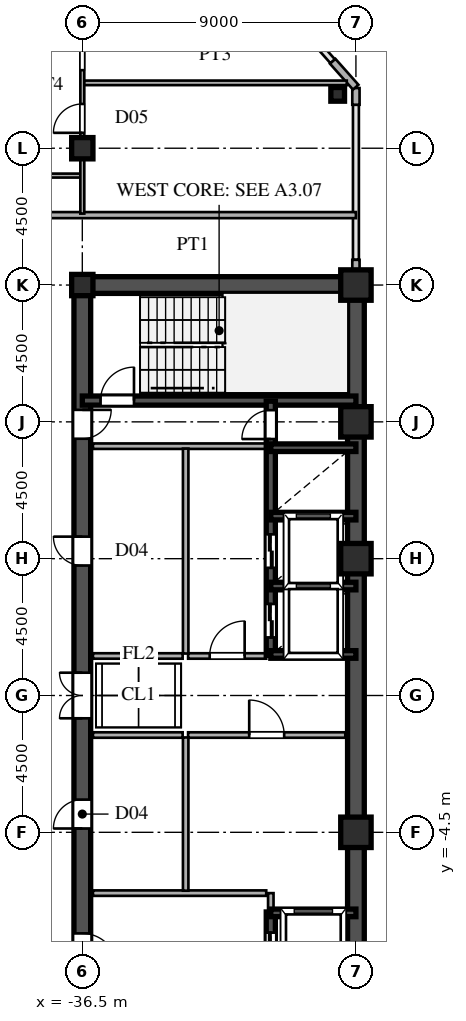
"""IFC4 building model, lengths in metres.
Left out: names, types, materials, properties, quantities, classifications, styles, units other than length and angle.
Written with IfcOpenShell. Run it as: python <this file> out.ifc"""

import sys

from ifc_helpers import new_model, si_unit, direction, frame, frame_2d, origin, origin_2d, place, context, subcontext, project, spatial, rectangle, hollow_rectangle, i_section, extrude, source, transform, mapped, element, fill, save


model = new_model("IFC4")
c1 = context("Model", 3, precision=1e-05, world=origin(), true_north=direction((0.0, 1.0)))
c2 = subcontext(c1, "Body", "Model", "MODEL_VIEW")
j1 = project(units=[si_unit("LENGTHUNIT", "METRE"), si_unit("PLANEANGLEUNIT", "RADIAN")], contexts=[c1])
p1 = place(None, origin())
s1 = spatial("IfcSite", under=j1, at=p1, CompositionType="ELEMENT")
p2 = place(p1, origin())
s2 = spatial("IfcBuilding", under=s1, at=p2, CompositionType="ELEMENT")
p3 = place(p2, frame((0.0, 0.0, 144.0)))
s3 = spatial("IfcBuildingStorey", under=s2, at=p3, CompositionType="ELEMENT", Elevation=144.0)
m1 = source(origin(), c2, "Body", "SweptSolid", [
    extrude(hollow_rectangle(XDim=1.0, YDim=1.0, WallThickness=0.042, at=origin_2d()), origin(), (0.0, 0.0, 1.0), 3.6),
])
for number, where, z_axis, x_axis in (
    (1, (-27.5, -4.5, 0.0), (0.0, 0.0, 1.0), (1.0, 0.0, 0.0)),
    (2, (-27.5, 4.5, 0.0), (0.0, 0.0, 1.0), (1.0, 0.0, 0.0)),
    (3, (-27.5, 9.0, 0.0), (0.0, 0.0, 1.0), (1.0, 0.0, 0.0)),
    (4, (-27.5, 13.5, 0.0), (0.0, 0.0, 1.0), (1.0, 0.0, 0.0)),
):
    element("IfcColumn", number, at=place(p3, frame(where, z_axis=z_axis, x_axis=x_axis)), inside=s3, PredefinedType="COLUMN", context=c2, shape_type="MappedRepresentation", body=[
        mapped(m1, transform((0.0, 0.0, 0.0), scale=1.0)),
    ])
m2 = source(origin(), c2, "Body", "SweptSolid", [
    extrude(i_section(OverallWidth=0.7, OverallDepth=0.7, WebThickness=0.028, FlangeThickness=0.045, at=origin_2d()), origin(), (0.0, 0.0, 1.0), 3.6),
])
for number, where, z_axis, x_axis in (
    (5, (-36.5, 13.5, 0.0), (0.0, 0.0, 1.0), (1.0, 0.0, 0.0)),
    (6, (-36.5, 18.0, 0.0), (0.0, 0.0, 1.0), (1.0, 0.0, 0.0)),
):
    element("IfcColumn", number, at=place(p3, frame(where, z_axis=z_axis, x_axis=x_axis)), inside=s3, PredefinedType="COLUMN", context=c2, shape_type="MappedRepresentation", body=[
        mapped(m2, transform((0.0, 0.0, 0.0), scale=1.0)),
    ])
m3 = source(origin(), c2, "Body", "SweptSolid", [
    extrude(hollow_rectangle(XDim=0.45, YDim=0.45, WallThickness=0.018, at=origin_2d()), origin(), (0.0, 0.0, 1.0), 3.6),
])
p4 = place(p3, frame((-28.1, 19.772, 0.0), z_axis=(0.0, 0.0, 1.0), x_axis=(1.0, 0.0, 0.0)))
e7 = element("IfcColumn", 7, at=p4, inside=s3, PredefinedType="COLUMN", context=c2, shape_type="MappedRepresentation", body=[
    mapped(m3, transform((0.0, 0.0, 0.0), scale=1.0)),
])
p5 = place(p3, frame((-27.5, 13.78, 0.0), z_axis=(0.0, 0.0, 1.0), x_axis=(0.0, 1.0, 0.0)))
e8 = element("IfcWall", 8, at=p5, inside=s3, PredefinedType="SOLIDWALL", context=c2, shape_type="SweptSolid", body=[
    extrude(rectangle(XDim=0.55, YDim=0.24, at=frame_2d((0.275, 0.0))), origin(), (0.0, 0.0, 1.0), 2.88),
])
p6 = place(p3, frame((-27.5, 19.43, 0.0), z_axis=(0.0, 0.0, 1.0), x_axis=(0.0, 1.0, 0.0)))
e9 = element("IfcWall", 9, at=p6, inside=s3, PredefinedType="SOLIDWALL", context=c2, shape_type="SweptSolid", body=[
    extrude(rectangle(XDim=0.55, YDim=0.24, at=frame_2d((0.275, 0.0))), origin(), (0.0, 0.0, 1.0), 3.38),
])
p7 = place(p3, frame((-27.507, 20.008, 0.0), z_axis=(0.0, 0.0, 1.0), x_axis=(-0.664337252513, 0.747432950119, 0.0)))
e10 = element("IfcWall", 10, at=p7, inside=s3, PredefinedType="SOLIDWALL", context=c2, shape_type="SweptSolid", body=[
    extrude(rectangle(XDim=1.14, YDim=0.24, at=frame_2d((0.57, 0.0))), origin(), (0.0, 0.0, 1.0), 3.38),
])
for number, where, z_axis, x_axis in (
    (11, (-27.5, -13.5, 0.0), (0.0, 0.0, 1.0), (0.0, 1.0, 0.0)),
    (12, (-27.5, 1.3, 0.0), (0.0, 0.0, 1.0), (0.0, 1.0, 0.0)),
):
    element("IfcWall", number, at=place(p3, frame(where, z_axis=z_axis, x_axis=x_axis)), inside=s3, PredefinedType="SHEAR", context=c2, shape_type="SweptSolid", body=[
        extrude(rectangle(XDim=12.2, YDim=0.55, at=frame_2d((6.1, 0.0))), origin(), (0.0, 0.0, 1.0), 3.38),
    ])
p8 = place(p3, frame((-27.5, -1.3, 0.0), z_axis=(0.0, 0.0, 1.0), x_axis=(0.0, 1.0, 0.0)))
e13 = element("IfcWall", 13, at=p8, inside=s3, PredefinedType="SHEAR", context=c2, shape_type="SweptSolid", body=[
    extrude(rectangle(XDim=2.6, YDim=0.55, at=frame_2d((1.3, 0.0))), origin(), (0.0, 0.0, 1.0), 3.38),
])
p9 = place(p3, frame((-36.5, 13.5, 0.0), z_axis=(0.0, 0.0, 1.0), x_axis=(1.0, 0.0, 0.0)))
e14 = element("IfcWall", 14, at=p9, inside=s3, PredefinedType="SHEAR", context=c2, shape_type="SweptSolid", body=[
    extrude(rectangle(XDim=9.0, YDim=0.55, at=frame_2d((4.5, 0.0))), origin(), (0.0, 0.0, 1.0), 3.38),
])
p10 = place(p3, frame((-36.5, -13.65, 0.0), z_axis=(0.0, 0.0, 1.0), x_axis=(0.0, 1.0, 0.0)))
e15 = element("IfcWall", 15, at=p10, inside=s3, PredefinedType="SHEAR", context=c2, shape_type="SweptSolid", body=[
    extrude(rectangle(XDim=7.15, YDim=0.55, at=frame_2d((3.575, 0.0))), origin(), (0.0, 0.0, 1.0), 3.38),
])
p11 = place(p10, frame((4.675, 0.0, 0.0)))
e16 = element("IfcOpeningElement", 16, at=p11, cuts=e15, PredefinedType="OPENING", context=c2, shape_type="SweptSolid", body=[
    extrude(rectangle(XDim=1.15, YDim=2.2, at=frame_2d((0.575, 1.1))), frame((0.0, 0.285, 0.0), z_axis=(0.0, -1.0, 0.0), x_axis=(1.0, 0.0, 0.0)), (0.0, 0.0, 1.0), 0.57),
])
p12 = place(p3, frame((-36.5, -1.3, 0.0), z_axis=(0.0, 0.0, 1.0), x_axis=(0.0, 1.0, 0.0)))
e17 = element("IfcWall", 17, at=p12, inside=s3, PredefinedType="SHEAR", context=c2, shape_type="SweptSolid", body=[
    extrude(rectangle(XDim=2.6, YDim=0.55, at=frame_2d((1.3, 0.0))), origin(), (0.0, 0.0, 1.0), 3.38),
])
p13 = place(p12, frame((0.55, 0.0, 0.0)))
e18 = element("IfcOpeningElement", 18, at=p13, cuts=e17, PredefinedType="OPENING", context=c2, shape_type="SweptSolid", body=[
    extrude(rectangle(XDim=1.5, YDim=2.3, at=frame_2d((0.75, 1.15))), frame((0.0, 0.285, 0.0), z_axis=(0.0, -1.0, 0.0), x_axis=(1.0, 0.0, 0.0)), (0.0, 0.0, 1.0), 0.57),
])
p14 = place(p3, frame((-36.5, 8.2, 0.0), z_axis=(0.0, 0.0, 1.0), x_axis=(0.0, 1.0, 0.0)))
e19 = element("IfcWall", 19, at=p14, inside=s3, PredefinedType="SHEAR", context=c2, shape_type="SweptSolid", body=[
    extrude(rectangle(XDim=5.45, YDim=0.55, at=frame_2d((2.725, 0.0))), origin(), (0.0, 0.0, 1.0), 3.38),
])
p15 = place(p14, frame((0.245, 0.0, 0.0)))
e20 = element("IfcOpeningElement", 20, at=p15, cuts=e19, PredefinedType="OPENING", context=c2, shape_type="SweptSolid", body=[
    extrude(rectangle(XDim=0.95, YDim=2.15, at=frame_2d((0.475, 1.075))), frame((0.0, 0.285, 0.0), z_axis=(0.0, -1.0, 0.0), x_axis=(1.0, 0.0, 0.0)), (0.0, 0.0, 1.0), 0.57),
])
p16 = place(p3, frame((-36.5, -6.5, 0.0), z_axis=(0.0, 0.0, 1.0), x_axis=(0.0, 1.0, 0.0)))
e21 = element("IfcWall", 21, at=p16, inside=s3, PredefinedType="SHEAR", context=c2, shape_type="SweptSolid", body=[
    extrude(rectangle(XDim=5.2, YDim=0.55, at=frame_2d((2.6, 0.0))), origin(), (0.0, 0.0, 1.0), 3.38),
])
p17 = place(p16, frame((2.125, 0.0, 0.0)))
e22 = element("IfcOpeningElement", 22, at=p17, cuts=e21, PredefinedType="OPENING", context=c2, shape_type="SweptSolid", body=[
    extrude(rectangle(XDim=0.95, YDim=2.15, at=frame_2d((0.475, 1.075))), frame((0.0, 0.285, 0.0), z_axis=(0.0, -1.0, 0.0), x_axis=(1.0, 0.0, 0.0)), (0.0, 0.0, 1.0), 0.57),
])
p18 = place(p3, frame((-36.5, 1.3, 0.0), z_axis=(0.0, 0.0, 1.0), x_axis=(0.0, 1.0, 0.0)))
e23 = element("IfcWall", 23, at=p18, inside=s3, PredefinedType="SHEAR", context=c2, shape_type="SweptSolid", body=[
    extrude(rectangle(XDim=6.9, YDim=0.55, at=frame_2d((3.45, 0.0))), origin(), (0.0, 0.0, 1.0), 3.38),
])
p19 = place(p18, frame((2.975, 0.0, 0.0)))
e24 = element("IfcOpeningElement", 24, at=p19, cuts=e23, PredefinedType="OPENING", context=c2, shape_type="SweptSolid", body=[
    extrude(rectangle(XDim=0.95, YDim=2.15, at=frame_2d((0.475, 1.075))), frame((0.0, 0.285, 0.0), z_axis=(0.0, -1.0, 0.0), x_axis=(1.0, 0.0, 0.0)), (0.0, 0.0, 1.0), 0.57),
])
p20 = place(p3, frame((-36.5, 9.7, 0.0), z_axis=(0.0, 0.0, 1.0), x_axis=(1.0, 0.0, 0.0)))
e25 = element("IfcWall", 25, at=p20, inside=s3, PredefinedType="SHEAR", context=c2, shape_type="SweptSolid", body=[
    extrude(rectangle(XDim=9.0, YDim=0.3, at=frame_2d((4.5, 0.0))), origin(), (0.0, 0.0, 1.0), 3.38),
])
p21 = place(p20, frame((0.6, 0.0, 0.0)))
e26 = element("IfcOpeningElement", 26, at=p21, cuts=e25, PredefinedType="OPENING", context=c2, shape_type="SweptSolid", body=[
    extrude(rectangle(XDim=1.1, YDim=2.2, at=frame_2d((0.55, 1.1))), frame((0.0, 0.16, 0.0), z_axis=(0.0, -1.0, 0.0), x_axis=(1.0, 0.0, 0.0)), (0.0, 0.0, 1.0), 0.32),
])
for number, where, z_axis, x_axis in (
    (27, (-30.3, -7.15, 0.0), (0.0, 0.0, 1.0), (1.0, 0.0, 0.0)),
    (28, (-30.3, 1.35, 0.0), (0.0, 0.0, 1.0), (1.0, 0.0, 0.0)),
    (29, (-30.3, 3.6, 0.0), (0.0, 0.0, 1.0), (1.0, 0.0, 0.0)),
    (30, (-30.3, 5.9, 0.0), (0.0, 0.0, 1.0), (1.0, 0.0, 0.0)),
    (31, (-30.3, 8.15, 0.0), (0.0, 0.0, 1.0), (1.0, 0.0, 0.0)),
):
    element("IfcWall", number, at=place(p3, frame(where, z_axis=z_axis, x_axis=x_axis)), inside=s3, PredefinedType="SHEAR", context=c2, shape_type="SweptSolid", body=[
        extrude(rectangle(XDim=2.8, YDim=0.25, at=frame_2d((1.4, 0.0))), origin(), (0.0, 0.0, 1.0), 3.38),
    ])
p22 = place(p3, frame((-30.3, -9.68, 0.0), z_axis=(0.0, 0.0, 1.0), x_axis=(0.0, 1.0, 0.0)))
e32 = element("IfcWall", 32, at=p22, inside=s3, PredefinedType="SHEAR", context=c2, shape_type="SweptSolid", body=[
    extrude(rectangle(XDim=2.56, YDim=0.3, at=frame_2d((1.28, 0.0))), origin(), (0.0, 0.0, 1.0), 3.38),
])
p23 = place(p22, frame((0.68, 0.0, 0.0)))
e33 = element("IfcOpeningElement", 33, at=p23, cuts=e32, PredefinedType="OPENING", context=c2, shape_type="SweptSolid", body=[
    extrude(rectangle(XDim=1.2, YDim=2.25, at=frame_2d((0.6, 1.125))), frame((0.0, 0.16, 0.0), z_axis=(0.0, -1.0, 0.0), x_axis=(1.0, 0.0, 0.0)), (0.0, 0.0, 1.0), 0.32),
])
p24 = place(p3, frame((-30.3, 1.32, 0.0), z_axis=(0.0, 0.0, 1.0), x_axis=(0.0, 1.0, 0.0)))
e34 = element("IfcWall", 34, at=p24, inside=s3, PredefinedType="SHEAR", context=c2, shape_type="SweptSolid", body=[
    extrude(rectangle(XDim=2.28, YDim=0.3, at=frame_2d((1.14, 0.0))), origin(), (0.0, 0.0, 1.0), 3.38),
])
p25 = place(p24, frame((0.59, 0.0, 0.0)))
e35 = element("IfcOpeningElement", 35, at=p25, cuts=e34, PredefinedType="OPENING", context=c2, shape_type="SweptSolid", body=[
    extrude(rectangle(XDim=1.1, YDim=2.2, at=frame_2d((0.55, 1.1))), frame((0.0, 0.16, 0.0), z_axis=(0.0, -1.0, 0.0), x_axis=(1.0, 0.0, 0.0)), (0.0, 0.0, 1.0), 0.32),
])
p26 = place(p3, frame((-30.3, 3.6, 0.0), z_axis=(0.0, 0.0, 1.0), x_axis=(0.0, 1.0, 0.0)))
e36 = element("IfcWall", 36, at=p26, inside=s3, PredefinedType="SHEAR", context=c2, shape_type="SweptSolid", body=[
    extrude(rectangle(XDim=2.3, YDim=0.3, at=frame_2d((1.15, 0.0))), origin(), (0.0, 0.0, 1.0), 3.38),
])
p27 = place(p26, frame((0.6, 0.0, 0.0)))
e37 = element("IfcOpeningElement", 37, at=p27, cuts=e36, PredefinedType="OPENING", context=c2, shape_type="SweptSolid", body=[
    extrude(rectangle(XDim=1.1, YDim=2.2, at=frame_2d((0.55, 1.1))), frame((0.0, 0.16, 0.0), z_axis=(0.0, -1.0, 0.0), x_axis=(1.0, 0.0, 0.0)), (0.0, 0.0, 1.0), 0.32),
])
p28 = place(p3, frame((-30.3, 5.9, 0.0), z_axis=(0.0, 0.0, 1.0), x_axis=(0.0, 1.0, 0.0)))
e38 = element("IfcWall", 38, at=p28, inside=s3, PredefinedType="SHEAR", context=c2, shape_type="SweptSolid", body=[
    extrude(rectangle(XDim=2.25, YDim=0.3, at=frame_2d((1.125, 0.0))), origin(), (0.0, 0.0, 1.0), 3.38),
])
p29 = place(p3, frame((-30.3, 8.15, 0.0), z_axis=(0.0, 0.0, 1.0), x_axis=(0.0, 1.0, 0.0)))
e39 = element("IfcWall", 39, at=p29, inside=s3, PredefinedType="SHEAR", context=c2, shape_type="SweptSolid", body=[
    extrude(rectangle(XDim=1.53, YDim=0.3, at=frame_2d((0.765, 0.0))), origin(), (0.0, 0.0, 1.0), 3.38),
])
p30 = place(p29, frame((0.285, 0.0, 0.0)))
e40 = element("IfcOpeningElement", 40, at=p30, cuts=e39, PredefinedType="OPENING", context=c2, shape_type="SweptSolid", body=[
    extrude(rectangle(XDim=0.95, YDim=2.15, at=frame_2d((0.475, 1.075))), frame((0.0, 0.16, 0.0), z_axis=(0.0, -1.0, 0.0), x_axis=(1.0, 0.0, 0.0)), (0.0, 0.0, 1.0), 0.32),
])
p31 = place(p3, frame((-36.15, -6.5, 0.0), z_axis=(0.0, 0.0, 1.0), x_axis=(1.0, 0.0, 0.0)))
e41 = element("IfcWall", 41, at=p31, inside=s3, PredefinedType="PARTITIONING", context=c2, shape_type="SweptSolid", body=[
    extrude(rectangle(XDim=5.7, YDim=0.18, at=frame_2d((2.85, 0.0))), origin(), (0.0, 0.0, 1.0), 3.38),
])
p32 = place(p3, frame((-30.3, -7.12, 0.0), z_axis=(0.0, 0.0, 1.0), x_axis=(0.0, 1.0, 0.0)))
e42 = element("IfcWall", 42, at=p32, inside=s3, PredefinedType="PARTITIONING", context=c2, shape_type="SweptSolid", body=[
    extrude(rectangle(XDim=0.62, YDim=0.18, at=frame_2d((0.31, 0.0))), origin(), (0.0, 0.0, 1.0), 3.38),
])
p33 = place(p3, frame((-36.15, 8.2, 0.0), z_axis=(0.0, 0.0, 1.0), x_axis=(1.0, 0.0, 0.0)))
e43 = element("IfcWall", 43, at=p33, inside=s3, PredefinedType="PARTITIONING", context=c2, shape_type="SweptSolid", body=[
    extrude(rectangle(XDim=5.7, YDim=0.18, at=frame_2d((2.85, 0.0))), origin(), (0.0, 0.0, 1.0), 3.38),
])
p34 = place(p3, frame((-33.1, -6.42, 0.0), z_axis=(0.0, 0.0, 1.0), x_axis=(0.0, 1.0, 0.0)))
e44 = element("IfcWall", 44, at=p34, inside=s3, PredefinedType="PARTITIONING", context=c2, shape_type="SweptSolid", body=[
    extrude(rectangle(XDim=5.04, YDim=0.18, at=frame_2d((2.52, 0.0))), origin(), (0.0, 0.0, 1.0), 3.38),
])
p35 = place(p3, frame((-33.1, 1.38, 0.0), z_axis=(0.0, 0.0, 1.0), x_axis=(0.0, 1.0, 0.0)))
e45 = element("IfcWall", 45, at=p35, inside=s3, PredefinedType="PARTITIONING", context=c2, shape_type="SweptSolid", body=[
    extrude(rectangle(XDim=6.74, YDim=0.18, at=frame_2d((3.37, 0.0))), origin(), (0.0, 0.0, 1.0), 3.38),
])
p36 = place(p3, frame((-33.02, -1.3, 0.0), z_axis=(0.0, 0.0, 1.0), x_axis=(1.0, 0.0, 0.0)))
e46 = element("IfcWall", 46, at=p36, inside=s3, PredefinedType="PARTITIONING", context=c2, shape_type="SweptSolid", body=[
    extrude(rectangle(XDim=5.17, YDim=0.18, at=frame_2d((2.585, 0.0))), origin(), (0.0, 0.0, 1.0), 3.38),
])
p37 = place(p36, frame((2.01, 0.0, 0.0)))
e47 = element("IfcOpeningElement", 47, at=p37, cuts=e46, PredefinedType="OPENING", context=c2, shape_type="SweptSolid", body=[
    extrude(rectangle(XDim=1.15, YDim=2.2, at=frame_2d((0.575, 1.1))), frame((0.0, 0.1, 0.0), z_axis=(0.0, -1.0, 0.0), x_axis=(1.0, 0.0, 0.0)), (0.0, 0.0, 1.0), 0.2),
])
p38 = place(p3, frame((-33.02, 1.3, 0.0), z_axis=(0.0, 0.0, 1.0), x_axis=(1.0, 0.0, 0.0)))
e48 = element("IfcWall", 48, at=p38, inside=s3, PredefinedType="PARTITIONING", context=c2, shape_type="SweptSolid", body=[
    extrude(rectangle(XDim=2.57, YDim=0.18, at=frame_2d((1.285, 0.0))), origin(), (0.0, 0.0, 1.0), 3.38),
])
p39 = place(p38, frame((0.71, 0.0, 0.0)))
e49 = element("IfcOpeningElement", 49, at=p39, cuts=e48, PredefinedType="OPENING", context=c2, shape_type="SweptSolid", body=[
    extrude(rectangle(XDim=1.15, YDim=2.2, at=frame_2d((0.575, 1.1))), frame((0.0, 0.1, 0.0), z_axis=(0.0, -1.0, 0.0), x_axis=(1.0, 0.0, 0.0)), (0.0, 0.0, 1.0), 0.2),
])
for number, where, z_axis, x_axis in (
    (50, (-36.15, -1.3, 0.0), (0.0, 0.0, 1.0), (1.0, 0.0, 0.0)),
    (51, (-36.15, 1.3, 0.0), (0.0, 0.0, 1.0), (1.0, 0.0, 0.0)),
):
    element("IfcWall", number, at=place(p3, frame(where, z_axis=z_axis, x_axis=x_axis)), inside=s3, PredefinedType="PARTITIONING", context=c2, shape_type="SweptSolid", body=[
        extrude(rectangle(XDim=2.95, YDim=0.18, at=frame_2d((1.475, 0.0))), origin(), (0.0, 0.0, 1.0), 3.38),
    ])
p40 = place(p3, frame((-38.215, 15.8, 0.0), z_axis=(0.0, 0.0, 1.0), x_axis=(1.0, 0.0, 0.0)))
e52 = element("IfcWall", 52, at=p40, inside=s3, PredefinedType="PARTITIONING", context=c2, shape_type="SweptSolid", body=[
    extrude(rectangle(XDim=10.715, YDim=0.2, at=frame_2d((5.357, 0.0))), origin(), (0.0, 0.0, 1.0), 3.38),
])
p41 = place(p3, frame((-41.0, 17.1, 0.0), z_axis=(0.0, 0.0, 1.0), x_axis=(1.0, 0.0, 0.0)))
e53 = element("IfcWall", 53, at=p41, inside=s3, PredefinedType="PARTITIONING", context=c2, shape_type="SweptSolid", body=[
    extrude(rectangle(XDim=4.45, YDim=0.13, at=frame_2d((2.225, 0.0))), origin(), (0.0, 0.0, 1.0), 3.38),
])
p42 = place(p3, frame((-36.45, 20.15, 0.0), z_axis=(0.0, 0.0, 1.0), x_axis=(1.0, 0.0, 0.0)))
e54 = element("IfcWall", 54, at=p42, inside=s3, PredefinedType="PARTITIONING", context=c2, shape_type="SweptSolid", body=[
    extrude(rectangle(XDim=8.649, YDim=0.15, at=frame_2d((4.325, 0.0))), origin(), (0.0, 0.0, 1.0), 3.38),
])
p43 = place(p3, frame((-36.5, 15.85, 0.0), z_axis=(0.0, 0.0, 1.0), x_axis=(0.0, 1.0, 0.0)))
e55 = element("IfcWall", 55, at=p43, inside=s3, PredefinedType="PARTITIONING", context=c2, shape_type="SweptSolid", body=[
    extrude(rectangle(XDim=6.119, YDim=0.13, at=frame_2d((3.06, 0.0))), origin(), (0.0, 0.0, 1.0), 2.78),
])
p44 = place(p43, frame((2.656, 0.0, 0.0)))
e56 = element("IfcOpeningElement", 56, at=p44, cuts=e55, PredefinedType="OPENING", context=c2, shape_type="SweptSolid", body=[
    extrude(rectangle(XDim=0.95, YDim=2.15, at=frame_2d((0.475, 1.075))), frame((0.0, 0.075, 0.0), z_axis=(0.0, -1.0, 0.0), x_axis=(1.0, 0.0, 0.0)), (0.0, 0.0, 1.0), 0.15),
])
p45 = place(p43, frame((4.717, 0.0, 0.0)))
e57 = element("IfcOpeningElement", 57, at=p45, cuts=e55, PredefinedType="OPENING", context=c2, shape_type="SweptSolid", body=[
    extrude(rectangle(XDim=0.95, YDim=2.15, at=frame_2d((0.475, 1.075))), frame((0.0, 0.075, 0.0), z_axis=(0.0, -1.0, 0.0), x_axis=(1.0, 0.0, 0.0)), (0.0, 0.0, 1.0), 0.15),
])
m4 = source(origin(), c2, "Body", "SweptSolid", [
    extrude(rectangle(XDim=1.15, YDim=2.2, at=frame_2d((0.575, 1.1))), frame((0.0, 0.025, 0.0), z_axis=(0.0, -1.0, 0.0), x_axis=(1.0, 0.0, 0.0)), (0.0, 0.0, 1.0), 0.05),
])
p46 = place(p11, frame((1.15, 0.0, 0.0), z_axis=(0.0, 0.0, 1.0), x_axis=(-1.0, 0.0, 0.0)))
e58 = element("IfcDoor", 58, at=p46, inside=s3, OperationType="SINGLE_SWING_LEFT", PredefinedType="DOOR", context=c2, shape_type="MappedRepresentation", body=[
    mapped(m4, transform((0.0, 0.0, 0.0), scale=1.0)),
])
fill(e16, e58)
m5 = source(origin(), c2, "Body", "SweptSolid", [
    extrude(rectangle(XDim=1.5, YDim=2.3, at=frame_2d((0.75, 1.15))), frame((0.0, 0.025, 0.0), z_axis=(0.0, -1.0, 0.0), x_axis=(1.0, 0.0, 0.0)), (0.0, 0.0, 1.0), 0.05),
])
p47 = place(p13, origin())
e59 = element("IfcDoor", 59, at=p47, inside=s3, OperationType="DOUBLE_SWING_LEFT", PredefinedType="DOOR", context=c2, shape_type="MappedRepresentation", body=[
    mapped(m5, transform((0.0, 0.0, 0.0), scale=1.0)),
])
fill(e18, e59)
m6 = source(origin(), c2, "Body", "SweptSolid", [
    extrude(rectangle(XDim=0.95, YDim=2.15, at=frame_2d((0.475, 1.075))), frame((0.0, 0.025, 0.0), z_axis=(0.0, -1.0, 0.0), x_axis=(1.0, 0.0, 0.0)), (0.0, 0.0, 1.0), 0.05),
])
p48 = place(p15, frame((0.95, 0.0, 0.0), z_axis=(0.0, 0.0, 1.0), x_axis=(-1.0, 0.0, 0.0)))
e60 = element("IfcDoor", 60, at=p48, inside=s3, OperationType="SINGLE_SWING_RIGHT", PredefinedType="DOOR", context=c2, shape_type="MappedRepresentation", body=[
    mapped(m6, transform((0.0, 0.0, 0.0), scale=1.0)),
])
fill(e20, e60)
p49 = place(p17, origin())
e61 = element("IfcDoor", 61, at=p49, inside=s3, OperationType="SINGLE_SWING_LEFT", PredefinedType="DOOR", context=c2, shape_type="MappedRepresentation", body=[
    mapped(m6, transform((0.0, 0.0, 0.0), scale=1.0)),
])
fill(e22, e61)
p50 = place(p19, origin())
e62 = element("IfcDoor", 62, at=p50, inside=s3, OperationType="SINGLE_SWING_RIGHT", PredefinedType="DOOR", context=c2, shape_type="MappedRepresentation", body=[
    mapped(m6, transform((0.0, 0.0, 0.0), scale=1.0)),
])
fill(e24, e62)
m7 = source(origin(), c2, "Body", "SweptSolid", [
    extrude(rectangle(XDim=1.1, YDim=2.2, at=frame_2d((0.55, 1.1))), frame((0.0, 0.025, 0.0), z_axis=(0.0, -1.0, 0.0), x_axis=(1.0, 0.0, 0.0)), (0.0, 0.0, 1.0), 0.05),
])
p51 = place(p21, origin())
e63 = element("IfcDoor", 63, at=p51, inside=s3, OperationType="SINGLE_SWING_RIGHT", PredefinedType="DOOR", context=c2, shape_type="MappedRepresentation", body=[
    mapped(m7, transform((0.0, 0.0, 0.0), scale=1.0)),
])
fill(e26, e63)
m8 = source(origin(), c2, "Body", "SweptSolid", [
    extrude(rectangle(XDim=1.2, YDim=2.25, at=frame_2d((0.6, 1.125))), frame((0.0, 0.025, 0.0), z_axis=(0.0, -1.0, 0.0), x_axis=(1.0, 0.0, 0.0)), (0.0, 0.0, 1.0), 0.05),
])
p52 = place(p23, origin())
e64 = element("IfcDoor", 64, at=p52, inside=s3, OperationType="DOUBLE_DOOR_SLIDING", PredefinedType="DOOR", context=c2, shape_type="MappedRepresentation", body=[
    mapped(m8, transform((0.0, 0.0, 0.0), scale=1.0)),
])
fill(e33, e64)
m9 = source(origin(), c2, "Body", "SweptSolid", [
    extrude(rectangle(XDim=1.1, YDim=2.2, at=frame_2d((0.55, 1.1))), frame((0.0, 0.025, 0.0), z_axis=(0.0, -1.0, 0.0), x_axis=(1.0, 0.0, 0.0)), (0.0, 0.0, 1.0), 0.05),
])
p53 = place(p25, origin())
e65 = element("IfcDoor", 65, at=p53, inside=s3, OperationType="DOUBLE_DOOR_SLIDING", PredefinedType="DOOR", context=c2, shape_type="MappedRepresentation", body=[
    mapped(m9, transform((0.0, 0.0, 0.0), scale=1.0)),
])
fill(e35, e65)
p54 = place(p27, origin())
e66 = element("IfcDoor", 66, at=p54, inside=s3, OperationType="DOUBLE_DOOR_SLIDING", PredefinedType="DOOR", context=c2, shape_type="MappedRepresentation", body=[
    mapped(m9, transform((0.0, 0.0, 0.0), scale=1.0)),
])
fill(e37, e66)
p55 = place(p30, origin())
e67 = element("IfcDoor", 67, at=p55, inside=s3, OperationType="SINGLE_SWING_LEFT", PredefinedType="DOOR", context=c2, shape_type="MappedRepresentation", body=[
    mapped(m6, transform((0.0, 0.0, 0.0), scale=1.0)),
])
fill(e40, e67)
p56 = place(p37, origin())
e68 = element("IfcDoor", 68, at=p56, inside=s3, OperationType="SINGLE_SWING_LEFT", PredefinedType="DOOR", context=c2, shape_type="MappedRepresentation", body=[
    mapped(m4, transform((0.0, 0.0, 0.0), scale=1.0)),
])
fill(e47, e68)
p57 = place(p39, origin())
e69 = element("IfcDoor", 69, at=p57, inside=s3, OperationType="SINGLE_SWING_RIGHT", PredefinedType="DOOR", context=c2, shape_type="MappedRepresentation", body=[
    mapped(m4, transform((0.0, 0.0, 0.0), scale=1.0)),
])
fill(e49, e69)
m10 = source(origin(), c2, "Body", "SweptSolid", [
    extrude(rectangle(XDim=0.95, YDim=2.15, at=frame_2d((0.475, 1.075))), frame((0.0, 0.025, 0.0), z_axis=(0.0, -1.0, 0.0), x_axis=(1.0, 0.0, 0.0)), (0.0, 0.0, 1.0), 0.05),
])
p58 = place(p44, origin())
e70 = element("IfcDoor", 70, at=p58, inside=s3, OperationType="SINGLE_SWING_LEFT", PredefinedType="DOOR", context=c2, shape_type="MappedRepresentation", body=[
    mapped(m10, transform((0.0, 0.0, 0.0), scale=1.0)),
])
fill(e56, e70)
save(model, sys.argv[1])
